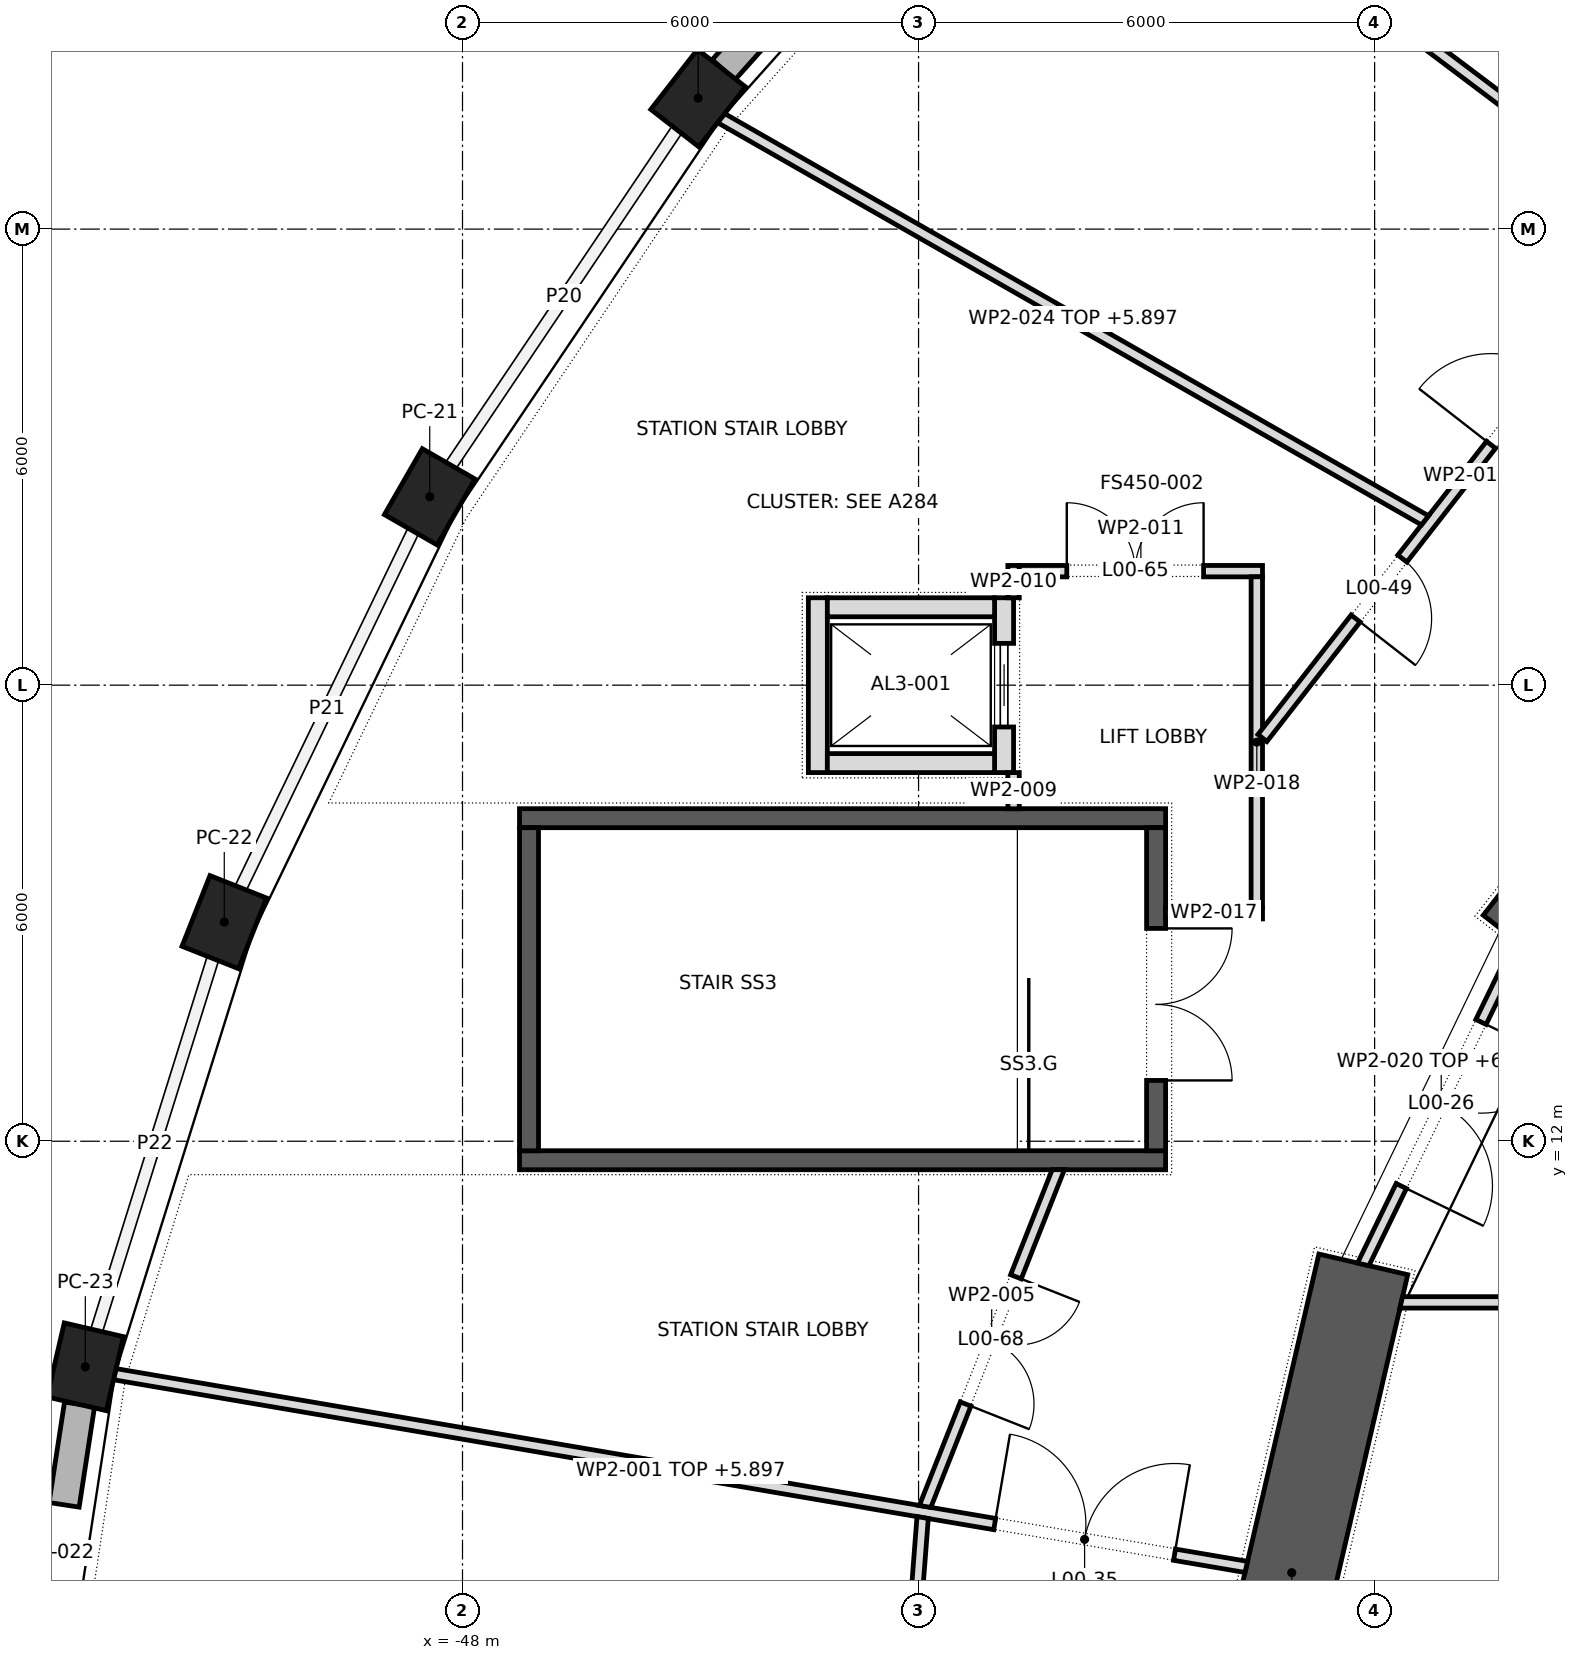
"""IFC4 building model, lengths in metres.
Left out: names, types, materials, properties, quantities, classifications, styles, units other than length and angle.
Written with IfcOpenShell. Run it as: python <this file> out.ifc"""

import sys

from ifc_helpers import new_model, si_unit, direction, frame, frame_2d, origin, origin_2d, place, context, subcontext, project, spatial, polyline, rectangle, outline, extrude, element, fill, save


model = new_model("IFC4")
c1 = context("Model", 3, precision=1e-05, world=origin(), true_north=direction((0.0, 1.0)))
c2 = subcontext(c1, "Body", "Model", "MODEL_VIEW")
j1 = project(units=[si_unit("LENGTHUNIT", "METRE"), si_unit("PLANEANGLEUNIT", "RADIAN")], contexts=[c1])
p1 = place(None, origin())
s1 = spatial("IfcSite", under=j1, at=p1, CompositionType="ELEMENT")
p2 = place(p1, origin())
s2 = spatial("IfcBuilding", under=s1, at=p2, CompositionType="ELEMENT")
p3 = place(p2, origin())
s3 = spatial("IfcBuildingStorey", under=s2, at=p3, CompositionType="ELEMENT", Elevation=0.0)
for number, where, z_axis, x_axis in (
    (1, (-44.899, 25.723, 0.0), (0.0, 0.0, 1.0), (-0.615, -0.789, 0.0)),
    (2, (-48.431, 20.478, 0.0), (0.0, 0.0, 1.0), (-0.499, -0.867, 0.0)),
    (3, (-51.134, 14.883, 0.0), (0.0, 0.0, 1.0), (-0.368, -0.93, 0.0)),
    (4, (-52.962, 9.033, 0.0), (0.0, 0.0, 1.0), (-0.226, -0.974, 0.0)),
):
    element("IfcColumn", number, at=place(p3, frame(where, z_axis=z_axis, x_axis=x_axis)), inside=s3, PredefinedType="COLUMN", context=c2, shape_type="SweptSolid", body=[
        extrude(rectangle(XDim=1.0, YDim=0.8, at=origin_2d()), origin(), (0.0, 0.0, 1.0), 7.0),
    ])
p4 = place(p3, frame((-28.79, 21.412, 0.0), z_axis=(0.0, 0.0, 1.0), x_axis=(-0.614825322247, -0.788663314174, 0.0)))
e5 = element("IfcWall", 5, at=p4, inside=s3, PredefinedType="SHEAR", context=c2, shape_type="SweptSolid", body=[
    extrude(rectangle(XDim=8.632, YDim=1.2, at=frame_2d((4.316, 0.0))), origin(), (0.0, 0.0, 1.0), 7.0),
])
p5 = place(p3, frame((-36.149, 10.38, 0.0), z_axis=(0.0, 0.0, 1.0), x_axis=(-0.226058185805, -0.974113800657, 0.0)))
e6 = element("IfcWall", 6, at=p5, inside=s3, PredefinedType="SHEAR", context=c2, shape_type="SweptSolid", body=[
    extrude(rectangle(XDim=8.329, YDim=1.2, at=frame_2d((4.165, 0.0))), origin(), (0.0, 0.0, 1.0), 7.0),
])
p6 = place(p3, frame((-40.933, 30.155, 0.0), z_axis=(0.0, 0.0, 1.0), x_axis=(-0.666902265084, -0.745145199827, 0.0)))
e7 = element("IfcWall", 7, at=p6, inside=s3, PredefinedType="STANDARD", context=c2, shape_type="SweptSolid", body=[
    extrude(rectangle(XDim=5.448, YDim=0.4, at=frame_2d((2.724, 0.0))), origin(), (0.0, 0.0, 1.0), 6.2),
])
p7 = place(p6, frame((1.224, 0.0, 0.0)))
e8 = element("IfcOpeningElement", 8, at=p7, cuts=e7, PredefinedType="OPENING", context=c2, shape_type="SweptSolid", body=[
    extrude(rectangle(XDim=3.0, YDim=3.0, at=frame_2d((1.5, 1.5))), frame((0.0, 0.212, 0.0), z_axis=(0.0, -1.0, 0.0), x_axis=(1.0, 0.0, 0.0)), (0.0, 0.0, 1.0), 0.424),
])
p8 = place(p6, frame((1.224, 0.0, 3.45)))
e9 = element("IfcOpeningElement", 9, at=p8, cuts=e7, PredefinedType="OPENING", context=c2, shape_type="SweptSolid", body=[
    extrude(rectangle(XDim=3.0, YDim=2.25, at=frame_2d((1.5, 1.125))), frame((0.0, 0.212, 0.0), z_axis=(0.0, -1.0, 0.0), x_axis=(1.0, 0.0, 0.0)), (0.0, 0.0, 1.0), 0.424),
])
p9 = place(p3, frame((-53.038, 8.539, 0.0), z_axis=(0.0, 0.0, 1.0), x_axis=(-0.151778822734, -0.988414482375, 0.0)))
e10 = element("IfcWall", 10, at=p9, inside=s3, PredefinedType="STANDARD", context=c2, shape_type="SweptSolid", body=[
    extrude(rectangle(XDim=5.075, YDim=0.4, at=frame_2d((2.538, 0.0))), origin(), (0.0, 0.0, 1.0), 6.2),
])
p10 = place(p9, frame((1.337, 0.0, 0.0)))
e11 = element("IfcOpeningElement", 11, at=p10, cuts=e10, PredefinedType="OPENING", context=c2, shape_type="SweptSolid", body=[
    extrude(rectangle(XDim=2.4, YDim=2.4, at=frame_2d((1.2, 1.2))), frame((0.0, 0.212, 0.0), z_axis=(0.0, -1.0, 0.0), x_axis=(1.0, 0.0, 0.0)), (0.0, 0.0, 1.0), 0.424),
])
for number, where, z_axis, x_axis in (
    (12, (-47.25, 16.25, 0.0), (0.0, 0.0, 1.0), (1.0, 0.0, 0.0)),
    (13, (-47.25, 11.75, 0.0), (0.0, 0.0, 1.0), (1.0, 0.0, 0.0)),
):
    element("IfcWall", number, at=place(p3, frame(where, z_axis=z_axis, x_axis=x_axis)), inside=s3, PredefinedType="SHEAR", context=c2, shape_type="SweptSolid", body=[
        extrude(rectangle(XDim=8.5, YDim=0.25, at=frame_2d((4.25, 0.0))), origin(), (0.0, 0.0, 1.0), 6.65),
    ])
p11 = place(p3, frame((-47.125, 11.875, 0.0), z_axis=(0.0, 0.0, 1.0), x_axis=(0.0, 1.0, 0.0)))
e14 = element("IfcWall", 14, at=p11, inside=s3, PredefinedType="SHEAR", context=c2, shape_type="SweptSolid", body=[
    extrude(rectangle(XDim=4.25, YDim=0.25, at=frame_2d((2.125, 0.0))), origin(), (0.0, 0.0, 1.0), 6.65),
])
p12 = place(p3, frame((-38.875, 11.875, 0.0), z_axis=(0.0, 0.0, 1.0), x_axis=(0.0, 1.0, 0.0)))
e15 = element("IfcWall", 15, at=p12, inside=s3, PredefinedType="SHEAR", context=c2, shape_type="SweptSolid", body=[
    extrude(rectangle(XDim=4.25, YDim=0.25, at=frame_2d((2.125, 0.0))), origin(), (0.0, 0.0, 1.0), 6.65),
])
p13 = place(p12, frame((0.925, 0.0, 0.0)))
e16 = element("IfcOpeningElement", 16, at=p13, cuts=e15, PredefinedType="OPENING", context=c2, shape_type="SweptSolid", body=[
    extrude(rectangle(XDim=2.0, YDim=2.1, at=frame_2d((1.0, 1.05))), frame((0.0, 0.137, 0.0), z_axis=(0.0, -1.0, 0.0), x_axis=(1.0, 0.0, 0.0)), (0.0, 0.0, 1.0), 0.274),
])
p14 = place(p3, frame((-43.325, 16.85, 0.0), z_axis=(0.0, 0.0, 1.0), x_axis=(0.0, 1.0, 0.0)))
e17 = element("IfcWall", 17, at=p14, inside=s3, PredefinedType="PARTITIONING", context=c2, shape_type="SweptSolid", body=[
    extrude(rectangle(XDim=2.3, YDim=0.25, at=frame_2d((1.15, 0.0))), origin(), (0.0, 0.0, 1.0), 6.65),
])
p15 = place(p3, frame((-40.875, 16.85, 0.0), z_axis=(0.0, 0.0, 1.0), x_axis=(0.0, 1.0, 0.0)))
e18 = element("IfcWall", 18, at=p15, inside=s3, PredefinedType="PARTITIONING", context=c2, shape_type="SweptSolid", body=[
    extrude(rectangle(XDim=2.3, YDim=0.25, at=frame_2d((1.15, 0.0))), origin(), (0.0, 0.0, 1.0), 6.65),
])
p16 = place(p15, frame((0.6, 0.0, 0.0)))
e19 = element("IfcOpeningElement", 19, at=p16, cuts=e18, PredefinedType="OPENING", context=c2, shape_type="SweptSolid", body=[
    extrude(rectangle(XDim=1.1, YDim=2.1, at=frame_2d((0.55, 1.05))), frame((0.0, 0.137, 0.0), z_axis=(0.0, -1.0, 0.0), x_axis=(1.0, 0.0, 0.0)), (0.0, 0.0, 1.0), 0.274),
])
for number, where, z_axis, x_axis in (
    (20, (-43.2, 19.025, 0.0), (0.0, 0.0, 1.0), (1.0, 0.0, 0.0)),
    (21, (-43.2, 16.975, 0.0), (0.0, 0.0, 1.0), (1.0, 0.0, 0.0)),
):
    element("IfcWall", number, at=place(p3, frame(where, z_axis=z_axis, x_axis=x_axis)), inside=s3, PredefinedType="PARTITIONING", context=c2, shape_type="SweptSolid", body=[
        extrude(rectangle(XDim=2.2, YDim=0.25, at=frame_2d((1.1, 0.0))), origin(), (0.0, 0.0, 1.0), 6.65),
    ])
p17 = place(p3, frame((-52.575, 8.936, 0.0), z_axis=(0.0, 0.0, 1.0), x_axis=(0.985799938149, -0.167924036236, 0.0)))
e22 = element("IfcWall", 22, at=p17, inside=s3, PredefinedType="PARTITIONING", context=c2, shape_type="SweptSolid", body=[
    extrude(outline(polyline([(-0.004, -0.075), (15.097, -0.075), (15.106, 0.075), (0.004, 0.075), (-0.004, -0.075)])), origin(), (0.0, 0.0, 1.0), 5.897),
])
p18 = place(p17, frame((11.743, 0.0, 0.0)))
e23 = element("IfcOpeningElement", 23, at=p18, cuts=e22, PredefinedType="OPENING", context=c2, shape_type="SweptSolid", body=[
    extrude(rectangle(XDim=2.4, YDim=2.1, at=frame_2d((1.2, 1.05))), frame((0.0, 0.087, 0.0), z_axis=(0.0, -1.0, 0.0), x_axis=(1.0, 0.0, 0.0)), (0.0, 0.0, 1.0), 0.174),
])
p19 = place(p3, frame((-41.946, 7.05, 0.0), z_axis=(0.0, 0.0, 1.0), x_axis=(-0.076457040773, -0.997072876432, 0.0)))
e24 = element("IfcWall", 24, at=p19, inside=s3, PredefinedType="PARTITIONING", context=c2, shape_type="SweptSolid", body=[
    extrude(outline(polyline([(-0.007, -0.075), (9.356, -0.075), (9.356, 0.075), (0.007, 0.075), (-0.007, -0.075)])), origin(), (0.0, 0.0, 1.0), 6.65),
])
p20 = place(p19, frame((3.493, 0.0, 0.0)))
e25 = element("IfcOpeningElement", 25, at=p20, cuts=e24, PredefinedType="OPENING", context=c2, shape_type="SweptSolid", body=[
    extrude(rectangle(XDim=2.4, YDim=2.1, at=frame_2d((1.2, 1.05))), frame((0.0, 0.087, 0.0), z_axis=(0.0, -1.0, 0.0), x_axis=(1.0, 0.0, 0.0)), (0.0, 0.0, 1.0), 0.174),
])
p21 = place(p3, frame((-41.914, 7.195, 0.0), z_axis=(0.0, 0.0, 1.0), x_axis=(0.367845408551, 0.929886958403, 0.0)))
e26 = element("IfcWall", 26, at=p21, inside=s3, PredefinedType="PARTITIONING", context=c2, shape_type="SweptSolid", body=[
    extrude(outline(polyline([(0.016, -0.075), (4.794, -0.075), (4.735, 0.075), (-0.016, 0.075), (0.016, -0.075)])), origin(), (0.0, 0.0, 1.0), 6.65),
])
p22 = place(p21, frame((1.45, 0.0, 0.0)))
e27 = element("IfcOpeningElement", 27, at=p22, cuts=e26, PredefinedType="OPENING", context=c2, shape_type="SweptSolid", body=[
    extrude(rectangle(XDim=1.8, YDim=2.1, at=frame_2d((0.9, 1.05))), frame((0.0, 0.087, 0.0), z_axis=(0.0, -1.0, 0.0), x_axis=(1.0, 0.0, 0.0)), (0.0, 0.0, 1.0), 0.174),
])
p23 = place(p3, frame((-40.75, 16.374, 0.0), z_axis=(0.0, 0.0, 1.0), x_axis=(0.0, 1.0, 0.0)))
e28 = element("IfcWall", 28, at=p23, inside=s3, PredefinedType="PARTITIONING", context=c2, shape_type="SweptSolid", body=[
    extrude(rectangle(XDim=0.476, YDim=0.15, at=frame_2d((0.238, 0.0))), origin(), (0.0, 0.0, 1.0), 6.65),
])
p24 = place(p3, frame((-40.75, 19.15, 0.0), z_axis=(0.0, 0.0, 1.0), x_axis=(0.0, 1.0, 0.0)))
e29 = element("IfcWall", 29, at=p24, inside=s3, PredefinedType="PARTITIONING", context=c2, shape_type="SweptSolid", body=[
    extrude(rectangle(XDim=0.425, YDim=0.15, at=frame_2d((0.212, 0.0))), origin(), (0.0, 0.0, 1.0), 6.65),
])
p25 = place(p3, frame((-40.675, 19.5, 0.0), z_axis=(0.0, 0.0, 1.0), x_axis=(1.0, 0.0, 0.0)))
e30 = element("IfcWall", 30, at=p25, inside=s3, PredefinedType="PARTITIONING", context=c2, shape_type="SweptSolid", body=[
    extrude(rectangle(XDim=3.2, YDim=0.15, at=frame_2d((1.6, 0.0))), origin(), (0.0, 0.0, 1.0), 6.65),
])
p26 = place(p25, frame((0.625, 0.0, 0.0)))
e31 = element("IfcOpeningElement", 31, at=p26, cuts=e30, PredefinedType="OPENING", context=c2, shape_type="SweptSolid", body=[
    extrude(rectangle(XDim=1.8, YDim=2.1, at=frame_2d((0.9, 1.05))), frame((0.0, 0.087, 0.0), z_axis=(0.0, -1.0, 0.0), x_axis=(1.0, 0.0, 0.0)), (0.0, 0.0, 1.0), 0.174),
])
p27 = place(p3, frame((-40.338, 30.225, 0.0), z_axis=(0.0, 0.0, 1.0), x_axis=(0.798789212221, -0.601610999267, 0.0)))
e32 = element("IfcWall", 32, at=p27, inside=s3, PredefinedType="PARTITIONING", context=c2, shape_type="SweptSolid", body=[
    extrude(outline(polyline([(-0.011, -0.075), (10.273, -0.075), (10.273, 0.075), (0.011, 0.075), (-0.011, -0.075)])), origin(), (0.0, 0.0, 1.0), 6.05),
])
p28 = place(p3, frame((-37.475, 15.0, 0.0), z_axis=(0.0, 0.0, 1.0), x_axis=(-1.0, 0.0, 0.0)))
e33 = element("IfcWall", 33, at=p28, inside=s3, PredefinedType="PARTITIONING", context=c2, shape_type="SweptSolid", body=[
    extrude(rectangle(XDim=1.276, YDim=0.15, at=frame_2d((0.638, 0.0))), origin(), (0.0, 0.0, 1.0), 6.65),
])
p29 = place(p3, frame((-37.55, 15.075, 0.0), z_axis=(0.0, 0.0, 1.0), x_axis=(0.0, 1.0, 0.0)))
e34 = element("IfcWall", 34, at=p29, inside=s3, PredefinedType="PARTITIONING", context=c2, shape_type="SweptSolid", body=[
    extrude(rectangle(XDim=4.351, YDim=0.15, at=frame_2d((2.176, 0.0))), origin(), (0.0, 0.0, 1.0), 6.65),
])
p30 = place(p3, frame((-37.476, 17.305, 0.0), z_axis=(0.0, 0.0, 1.0), x_axis=(0.614894762304, 0.788609175252, 0.0)))
e35 = element("IfcWall", 35, at=p30, inside=s3, PredefinedType="PARTITIONING", context=c2, shape_type="SweptSolid", body=[
    extrude(rectangle(XDim=8.729, YDim=0.15, at=frame_2d((4.365, 0.0))), origin(), (0.0, 0.0, 1.0), 6.65),
])
p31 = place(p30, frame((4.891, 0.0, 0.0)))
e36 = element("IfcOpeningElement", 36, at=p31, cuts=e35, PredefinedType="OPENING", context=c2, shape_type="SweptSolid", body=[
    extrude(rectangle(XDim=2.4, YDim=2.1, at=frame_2d((1.2, 1.05))), frame((0.0, 0.087, 0.0), z_axis=(0.0, -1.0, 0.0), x_axis=(1.0, 0.0, 0.0)), (0.0, 0.0, 1.0), 0.174),
])
p32 = place(p30, frame((1.993, 0.0, 0.0)))
e37 = element("IfcOpeningElement", 37, at=p32, cuts=e35, PredefinedType="OPENING", context=c2, shape_type="SweptSolid", body=[
    extrude(rectangle(XDim=1.0, YDim=2.1, at=frame_2d((0.5, 1.05))), frame((0.0, 0.087, 0.0), z_axis=(0.0, -1.0, 0.0), x_axis=(1.0, 0.0, 0.0)), (0.0, 0.0, 1.0), 0.174),
])
p33 = place(p3, frame((-36.15, 10.38, 0.0), z_axis=(0.0, 0.0, 1.0), x_axis=(0.436936398764, 0.899492403212, 0.0)))
e38 = element("IfcWall", 38, at=p33, inside=s3, PredefinedType="PARTITIONING", context=c2, shape_type="SweptSolid", body=[
    extrude(outline(polyline([(0.017, -0.075), (4.682, -0.075), (4.714, 0.075), (-0.017, 0.075), (0.017, -0.075)])), origin(), (0.0, 0.0, 1.0), 6.1),
])
p34 = place(p33, frame((1.146, 0.0, 0.0)))
e39 = element("IfcOpeningElement", 39, at=p34, cuts=e38, PredefinedType="OPENING", context=c2, shape_type="SweptSolid", body=[
    extrude(rectangle(XDim=2.4, YDim=2.1, at=frame_2d((1.2, 1.05))), frame((0.0, 0.087, 0.0), z_axis=(0.0, -1.0, 0.0), x_axis=(1.0, 0.0, 0.0)), (0.0, 0.0, 1.0), 0.174),
])
p35 = place(p3, frame((-35.65, 9.88, 0.0), z_axis=(0.0, 0.0, 1.0), x_axis=(1.0, 0.0, 0.0)))
e40 = element("IfcWall", 40, at=p35, inside=s3, PredefinedType="PARTITIONING", context=c2, shape_type="SweptSolid", body=[
    extrude(outline(polyline([(-0.017, -0.075), (16.651, -0.075), (16.651, 0.075), (0.017, 0.075), (-0.017, -0.075)])), origin(), (0.0, 0.0, 1.0), 6.65),
])
p36 = place(p35, frame((7.445, 0.0, 0.0)))
e41 = element("IfcOpeningElement", 41, at=p36, cuts=e40, PredefinedType="OPENING", context=c2, shape_type="SweptSolid", body=[
    extrude(rectangle(XDim=1.8, YDim=2.1, at=frame_2d((0.9, 1.05))), frame((0.0, 0.087, 0.0), z_axis=(0.0, -1.0, 0.0), x_axis=(1.0, 0.0, 0.0)), (0.0, 0.0, 1.0), 0.174),
])
p37 = place(p3, frame((-35.337, 20.168, 0.0), z_axis=(0.0, 0.0, 1.0), x_axis=(-0.868241733504, 0.496141403435, 0.0)))
e42 = element("IfcWall", 42, at=p37, inside=s3, PredefinedType="PARTITIONING", context=c2, shape_type="SweptSolid", body=[
    extrude(outline(polyline([(-0.011, -0.075), (10.655, -0.075), (10.677, 0.075), (0.011, 0.075), (-0.011, -0.075)])), origin(), (0.0, 0.0, 1.0), 5.897),
])
p38 = place(p10, frame((2.4, 0.0, 0.0), z_axis=(0.0, 0.0, 1.0), x_axis=(-1.0, 0.0, 0.0)))
e43 = element("IfcDoor", 43, at=p38, inside=s3, OperationType="DOUBLE_DOOR_SINGLE_SWING", PredefinedType="DOOR", context=c2, shape_type="SweptSolid", body=[
    extrude(rectangle(XDim=2.4, YDim=2.4, at=frame_2d((1.2, 1.2))), frame((0.0, 0.025, 0.0), z_axis=(0.0, -1.0, 0.0), x_axis=(1.0, 0.0, 0.0)), (0.0, 0.0, 1.0), 0.05),
])
fill(e11, e43)
p39 = place(p16, origin())
e44 = element("IfcDoor", 44, at=p39, inside=s3, OperationType="SLIDING_TO_LEFT", PredefinedType="DOOR", context=c2, shape_type="SweptSolid", body=[
    extrude(rectangle(XDim=1.1, YDim=2.1, at=frame_2d((0.55, 1.05))), frame((0.0, 0.025, 0.0), z_axis=(0.0, -1.0, 0.0), x_axis=(1.0, 0.0, 0.0)), (0.0, 0.0, 1.0), 0.05),
])
fill(e19, e44)
p40 = place(p13, frame((2.0, 0.0, 0.0), z_axis=(0.0, 0.0, 1.0), x_axis=(-1.0, 0.0, 0.0)))
e45 = element("IfcDoor", 45, at=p40, inside=s3, OperationType="DOUBLE_DOOR_SINGLE_SWING", PredefinedType="DOOR", context=c2, shape_type="SweptSolid", body=[
    extrude(rectangle(XDim=2.0, YDim=2.1, at=frame_2d((1.0, 1.05))), frame((0.0, 0.025, 0.0), z_axis=(0.0, -1.0, 0.0), x_axis=(1.0, 0.0, 0.0)), (0.0, 0.0, 1.0), 0.05),
])
fill(e16, e45)
p41 = place(p34, frame((2.4, 0.0, 0.0), z_axis=(0.0, 0.0, 1.0), x_axis=(-1.0, 0.0, 0.0)))
e46 = element("IfcDoor", 46, at=p41, inside=s3, OperationType="DOUBLE_DOOR_SINGLE_SWING", PredefinedType="DOOR", context=c2, shape_type="SweptSolid", body=[
    extrude(rectangle(XDim=2.4, YDim=2.1, at=frame_2d((1.2, 1.05))), frame((0.0, 0.025, 0.0), z_axis=(0.0, -1.0, 0.0), x_axis=(1.0, 0.0, 0.0)), (0.0, 0.0, 1.0), 0.05),
])
fill(e39, e46)
p42 = place(p18, origin())
e47 = element("IfcDoor", 47, at=p42, inside=s3, OperationType="DOUBLE_DOOR_SINGLE_SWING", PredefinedType="DOOR", context=c2, shape_type="SweptSolid", body=[
    extrude(rectangle(XDim=2.4, YDim=2.1, at=frame_2d((1.2, 1.05))), frame((0.0, 0.025, 0.0), z_axis=(0.0, -1.0, 0.0), x_axis=(1.0, 0.0, 0.0)), (0.0, 0.0, 1.0), 0.05),
])
fill(e23, e47)
p43 = place(p31, origin())
e48 = element("IfcDoor", 48, at=p43, inside=s3, OperationType="DOUBLE_DOOR_SINGLE_SWING", PredefinedType="DOOR", context=c2, shape_type="SweptSolid", body=[
    extrude(rectangle(XDim=2.4, YDim=2.1, at=frame_2d((1.2, 1.05))), frame((0.0, 0.025, 0.0), z_axis=(0.0, -1.0, 0.0), x_axis=(1.0, 0.0, 0.0)), (0.0, 0.0, 1.0), 0.05),
])
fill(e36, e48)
p44 = place(p32, frame((1.0, 0.0, 0.0), z_axis=(0.0, 0.0, 1.0), x_axis=(-1.0, 0.0, 0.0)))
e49 = element("IfcDoor", 49, at=p44, inside=s3, OperationType="SINGLE_SWING_LEFT", PredefinedType="DOOR", context=c2, shape_type="SweptSolid", body=[
    extrude(rectangle(XDim=1.0, YDim=2.1, at=frame_2d((0.5, 1.05))), frame((0.0, 0.025, 0.0), z_axis=(0.0, -1.0, 0.0), x_axis=(1.0, 0.0, 0.0)), (0.0, 0.0, 1.0), 0.05),
])
fill(e37, e49)
p45 = place(p26, origin())
e50 = element("IfcDoor", 50, at=p45, inside=s3, OperationType="DOUBLE_DOOR_SINGLE_SWING", PredefinedType="DOOR", context=c2, shape_type="SweptSolid", body=[
    extrude(rectangle(XDim=1.8, YDim=2.1, at=frame_2d((0.9, 1.05))), frame((0.0, 0.025, 0.0), z_axis=(0.0, -1.0, 0.0), x_axis=(1.0, 0.0, 0.0)), (0.0, 0.0, 1.0), 0.05),
])
fill(e31, e50)
p46 = place(p22, frame((1.8, 0.0, 0.0), z_axis=(0.0, 0.0, 1.0), x_axis=(-1.0, 0.0, 0.0)))
e51 = element("IfcDoor", 51, at=p46, inside=s3, OperationType="DOUBLE_DOOR_SINGLE_SWING", PredefinedType="DOOR", context=c2, shape_type="SweptSolid", body=[
    extrude(rectangle(XDim=1.8, YDim=2.1, at=frame_2d((0.9, 1.05))), frame((0.0, 0.025, 0.0), z_axis=(0.0, -1.0, 0.0), x_axis=(1.0, 0.0, 0.0)), (0.0, 0.0, 1.0), 0.05),
])
fill(e27, e51)
save(model, sys.argv[1])
